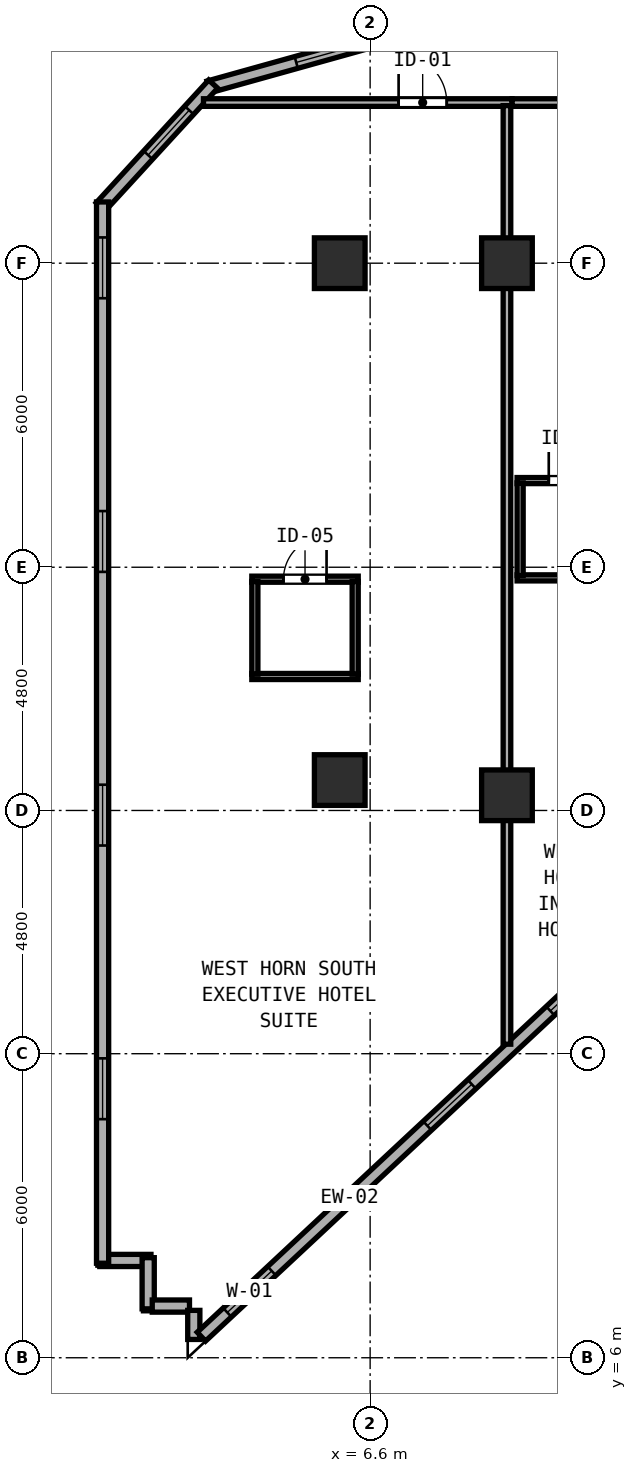
"""IFC4 building model, lengths in metres.
Left out: names, types, materials, properties, quantities, classifications, styles, units other than length and angle.
Written with IfcOpenShell. Run it as: python <this file> out.ifc"""

import sys

from ifc_helpers import new_model, si_unit, direction, frame, frame_2d, origin, origin_2d, place, context, subcontext, project, spatial, rectangle, hollow_rectangle, extrude, element, fill, save


model = new_model("IFC4")
c1 = context("Model", 3, precision=1e-05, world=origin(), true_north=direction((0.0, 1.0)))
c2 = subcontext(c1, "Body", "Model", "MODEL_VIEW")
j1 = project(units=[si_unit("LENGTHUNIT", "METRE"), si_unit("PLANEANGLEUNIT", "RADIAN")], contexts=[c1])
p1 = place(None, origin())
s1 = spatial("IfcSite", under=j1, at=p1, CompositionType="ELEMENT")
p2 = place(p1, origin())
s2 = spatial("IfcBuilding", under=s1, at=p2, CompositionType="ELEMENT")
p3 = place(p2, frame((0.0, 0.0, 81.8)))
s3 = spatial("IfcBuildingStorey", under=s2, at=p3, CompositionType="ELEMENT", Elevation=81.8)
for number, where, z_axis, x_axis in (
    (1, (6.0, 17.4, 0.0), (0.0, 0.0, 1.0), (1.0, 0.0, 0.0)),
    (2, (6.0, 27.6, 0.0), (0.0, 0.0, 1.0), (1.0, 0.0, 0.0)),
    (3, (9.3, 17.1, 0.0), (0.0, 0.0, 1.0), (1.0, 0.0, 0.0)),
    (4, (9.3, 27.6, 0.0), (0.0, 0.0, 1.0), (1.0, 0.0, 0.0)),
):
    element("IfcColumn", number, at=place(p3, frame(where, z_axis=z_axis, x_axis=x_axis)), inside=s3, PredefinedType="COLUMN", context=c2, shape_type="SweptSolid", body=[
        extrude(hollow_rectangle(XDim=1.0, YDim=1.0, WallThickness=0.038, at=origin_2d()), origin(), (0.0, 0.0, 1.0), 3.8),
    ])
for number, where, z_axis, x_axis in (
    (5, (1.265, 7.92, 0.0), (0.0, 0.0, 1.0), (1.0, 0.0, 0.0)),
    (6, (2.22, 7.975, 0.0), (0.0, 0.0, 1.0), (0.0, -1.0, 0.0)),
):
    element("IfcWall", number, at=place(p3, frame(where, z_axis=z_axis, x_axis=x_axis)), inside=s3, PredefinedType="SOLIDWALL", context=c2, shape_type="SweptSolid", body=[
        extrude(rectangle(XDim=1.01, YDim=0.24, at=frame_2d((0.505, 0.0))), origin(), (0.0, 0.0, 1.0), 3.6),
    ])
p4 = place(p3, frame((2.3, 7.02, 0.0), z_axis=(0.0, 0.0, 1.0), x_axis=(1.0, 0.0, 0.0)))
e7 = element("IfcWall", 7, at=p4, inside=s3, PredefinedType="SOLIDWALL", context=c2, shape_type="SweptSolid", body=[
    extrude(rectangle(XDim=0.735, YDim=0.24, at=frame_2d((0.367, 0.0))), origin(), (0.0, 0.0, 1.0), 3.6),
])
p5 = place(p3, frame((3.12, 6.935, 0.0), z_axis=(0.0, 0.0, 1.0), x_axis=(0.0, -1.0, 0.0)))
e8 = element("IfcWall", 8, at=p5, inside=s3, PredefinedType="SOLIDWALL", context=c2, shape_type="SweptSolid", body=[
    extrude(rectangle(XDim=0.574, YDim=0.24, at=frame_2d((0.287, 0.0))), origin(), (0.0, 0.0, 1.0), 3.6),
])
p6 = place(p3, frame((3.27, 6.416, 0.0), z_axis=(0.0, 0.0, 1.0), x_axis=(0.731064187858, 0.682308693505, 0.0)))
e9 = element("IfcWall", 9, at=p6, inside=s3, PredefinedType="SOLIDWALL", context=c2, shape_type="SweptSolid", body=[
    extrude(rectangle(XDim=11.833, YDim=0.24, at=frame_2d((5.916, 0.0))), origin(), (0.0, 0.0, 1.0), 3.6),
])
p7 = place(p6, frame((0.7, 0.0, 0.85)))
e10 = element("IfcOpeningElement", 10, at=p7, cuts=e9, PredefinedType="OPENING", context=c2, shape_type="SweptSolid", body=[
    extrude(rectangle(XDim=1.2, YDim=1.85, at=frame_2d((0.6, 0.925))), frame((0.0, 0.13, 0.0), z_axis=(0.0, -1.0, 0.0), x_axis=(1.0, 0.0, 0.0)), (0.0, 0.0, 1.0), 0.26),
])
p8 = place(p6, frame((6.1, 0.0, 0.85)))
e11 = element("IfcOpeningElement", 11, at=p8, cuts=e9, PredefinedType="OPENING", context=c2, shape_type="SweptSolid", body=[
    extrude(rectangle(XDim=1.2, YDim=1.85, at=frame_2d((0.6, 0.925))), frame((0.0, 0.13, 0.0), z_axis=(0.0, -1.0, 0.0), x_axis=(1.0, 0.0, 0.0)), (0.0, 0.0, 1.0), 0.26),
])
p9 = place(p6, frame((9.421, 0.0, 0.85)))
e12 = element("IfcOpeningElement", 12, at=p9, cuts=e9, PredefinedType="OPENING", context=c2, shape_type="SweptSolid", body=[
    extrude(rectangle(XDim=1.2, YDim=1.85, at=frame_2d((0.6, 0.925))), frame((0.0, 0.13, 0.0), z_axis=(0.0, -1.0, 0.0), x_axis=(1.0, 0.0, 0.0)), (0.0, 0.0, 1.0), 0.26),
])
p10 = place(p3, frame((12.173, 33.524, 0.0), z_axis=(0.0, 0.0, 1.0), x_axis=(-0.963197271032, -0.268795493036, 0.0)))
e13 = element("IfcWall", 13, at=p10, inside=s3, PredefinedType="SOLIDWALL", context=c2, shape_type="SweptSolid", body=[
    extrude(rectangle(XDim=9.095, YDim=0.24, at=frame_2d((4.548, 0.0))), origin(), (0.0, 0.0, 1.0), 3.6),
])
p11 = place(p10, frame((0.7, 0.0, 0.85)))
e14 = element("IfcOpeningElement", 14, at=p11, cuts=e13, PredefinedType="OPENING", context=c2, shape_type="SweptSolid", body=[
    extrude(rectangle(XDim=1.2, YDim=1.85, at=frame_2d((0.6, 0.925))), frame((0.0, 0.13, 0.0), z_axis=(0.0, -1.0, 0.0), x_axis=(1.0, 0.0, 0.0)), (0.0, 0.0, 1.0), 0.26),
])
p12 = place(p10, frame((6.1, 0.0, 0.85)))
e15 = element("IfcOpeningElement", 15, at=p12, cuts=e13, PredefinedType="OPENING", context=c2, shape_type="SweptSolid", body=[
    extrude(rectangle(XDim=1.2, YDim=1.85, at=frame_2d((0.6, 0.925))), frame((0.0, 0.13, 0.0), z_axis=(0.0, -1.0, 0.0), x_axis=(1.0, 0.0, 0.0)), (0.0, 0.0, 1.0), 0.26),
])
p13 = place(p3, frame((3.502, 31.134, 0.0), z_axis=(0.0, 0.0, 1.0), x_axis=(-0.675781844312, -0.737101688302, 0.0)))
e16 = element("IfcWall", 16, at=p13, inside=s3, PredefinedType="SOLIDWALL", context=c2, shape_type="SweptSolid", body=[
    extrude(rectangle(XDim=3.285, YDim=0.24, at=frame_2d((1.642, 0.0))), origin(), (0.0, 0.0, 1.0), 3.6),
])
p14 = place(p13, frame((0.7, 0.0, 0.85)))
e17 = element("IfcOpeningElement", 17, at=p14, cuts=e16, PredefinedType="OPENING", context=c2, shape_type="SweptSolid", body=[
    extrude(rectangle(XDim=1.2, YDim=1.85, at=frame_2d((0.6, 0.925))), frame((0.0, 0.13, 0.0), z_axis=(0.0, -1.0, 0.0), x_axis=(1.0, 0.0, 0.0)), (0.0, 0.0, 1.0), 0.26),
])
p15 = place(p3, frame((1.32, 28.808, 0.0), z_axis=(0.0, 0.0, 1.0), x_axis=(0.0, -1.0, 0.0)))
e18 = element("IfcWall", 18, at=p15, inside=s3, PredefinedType="SOLIDWALL", context=c2, shape_type="SweptSolid", body=[
    extrude(rectangle(XDim=20.943, YDim=0.24, at=frame_2d((10.472, 0.0))), origin(), (0.0, 0.0, 1.0), 3.6),
])
p16 = place(p15, frame((0.7, 0.0, 0.85)))
e19 = element("IfcOpeningElement", 19, at=p16, cuts=e18, PredefinedType="OPENING", context=c2, shape_type="SweptSolid", body=[
    extrude(rectangle(XDim=1.2, YDim=1.85, at=frame_2d((0.6, 0.925))), frame((0.0, 0.13, 0.0), z_axis=(0.0, -1.0, 0.0), x_axis=(1.0, 0.0, 0.0)), (0.0, 0.0, 1.0), 0.26),
])
p17 = place(p15, frame((6.1, 0.0, 0.85)))
e20 = element("IfcOpeningElement", 20, at=p17, cuts=e18, PredefinedType="OPENING", context=c2, shape_type="SweptSolid", body=[
    extrude(rectangle(XDim=1.2, YDim=1.85, at=frame_2d((0.6, 0.925))), frame((0.0, 0.13, 0.0), z_axis=(0.0, -1.0, 0.0), x_axis=(1.0, 0.0, 0.0)), (0.0, 0.0, 1.0), 0.26),
])
p18 = place(p15, frame((11.5, 0.0, 0.85)))
e21 = element("IfcOpeningElement", 21, at=p18, cuts=e18, PredefinedType="OPENING", context=c2, shape_type="SweptSolid", body=[
    extrude(rectangle(XDim=1.2, YDim=1.85, at=frame_2d((0.6, 0.925))), frame((0.0, 0.13, 0.0), z_axis=(0.0, -1.0, 0.0), x_axis=(1.0, 0.0, 0.0)), (0.0, 0.0, 1.0), 0.26),
])
p19 = place(p15, frame((16.9, 0.0, 0.85)))
e22 = element("IfcOpeningElement", 22, at=p19, cuts=e18, PredefinedType="OPENING", context=c2, shape_type="SweptSolid", body=[
    extrude(rectangle(XDim=1.2, YDim=1.85, at=frame_2d((0.6, 0.925))), frame((0.0, 0.13, 0.0), z_axis=(0.0, -1.0, 0.0), x_axis=(1.0, 0.0, 0.0)), (0.0, 0.0, 1.0), 0.26),
])
p20 = place(p3, frame((3.311, 30.77, 0.0), z_axis=(0.0, 0.0, 1.0), x_axis=(1.0, 0.0, 0.0)))
e23 = element("IfcWall", 23, at=p20, inside=s3, PredefinedType="PARTITIONING", context=c2, shape_type="SweptSolid", body=[
    extrude(rectangle(XDim=6.089, YDim=0.15, at=frame_2d((3.044, 0.0))), origin(), (0.0, 0.0, 1.0), 3.6),
])
p21 = place(p20, frame((4.801, 0.0, 0.0), z_axis=(0.0, 0.0, 1.0), x_axis=(-1.0, 0.0, 0.0)))
e24 = element("IfcOpeningElement", 24, at=p21, cuts=e23, PredefinedType="OPENING", context=c2, shape_type="SweptSolid", body=[
    extrude(rectangle(XDim=0.95, YDim=2.18, at=frame_2d((0.475, 1.09))), frame((0.0, 0.085, 0.0), z_axis=(0.0, -1.0, 0.0), x_axis=(1.0, 0.0, 0.0)), (0.0, 0.0, 1.0), 0.17),
])
p22 = place(p3, frame((9.3, 12.188, 0.0), z_axis=(0.0, 0.0, 1.0), x_axis=(0.0, 1.0, 0.0)))
e25 = element("IfcWall", 25, at=p22, inside=s3, PredefinedType="PARTITIONING", context=c2, shape_type="SweptSolid", body=[
    extrude(rectangle(XDim=18.522, YDim=0.15, at=frame_2d((9.261, 0.0))), origin(), (0.0, 0.0, 1.0), 3.6),
])
p23 = place(p3, frame((4.265, 21.364, 0.0), z_axis=(0.0, 0.0, 1.0), x_axis=(1.0, 0.0, 0.0)))
e26 = element("IfcWall", 26, at=p23, inside=s3, PredefinedType="PARTITIONING", context=c2, shape_type="SweptSolid", body=[
    extrude(rectangle(XDim=2.1, YDim=0.12, at=frame_2d((1.05, 0.0))), origin(), (0.0, 0.0, 1.0), 3.6),
])
p24 = place(p23, frame((1.475, 0.0, 0.0), z_axis=(0.0, 0.0, 1.0), x_axis=(-1.0, 0.0, 0.0)))
e27 = element("IfcOpeningElement", 27, at=p24, cuts=e26, PredefinedType="OPENING", context=c2, shape_type="SweptSolid", body=[
    extrude(rectangle(XDim=0.85, YDim=2.1, at=frame_2d((0.425, 1.05))), frame((0.0, 0.07, 0.0), z_axis=(0.0, -1.0, 0.0), x_axis=(1.0, 0.0, 0.0)), (0.0, 0.0, 1.0), 0.14),
])
p25 = place(p3, frame((4.265, 19.444, 0.0), z_axis=(0.0, 0.0, 1.0), x_axis=(1.0, 0.0, 0.0)))
e28 = element("IfcWall", 28, at=p25, inside=s3, PredefinedType="PARTITIONING", context=c2, shape_type="SweptSolid", body=[
    extrude(rectangle(XDim=2.1, YDim=0.12, at=frame_2d((1.05, 0.0))), origin(), (0.0, 0.0, 1.0), 3.6),
])
for number, where, z_axis, x_axis in (
    (29, (4.325, 19.489, 0.0), (0.0, 0.0, 1.0), (0.0, 1.0, 0.0)),
    (30, (6.305, 19.489, 0.0), (0.0, 0.0, 1.0), (0.0, 1.0, 0.0)),
):
    element("IfcWall", number, at=place(p3, frame(where, z_axis=z_axis, x_axis=x_axis)), inside=s3, PredefinedType="PARTITIONING", context=c2, shape_type="SweptSolid", body=[
        extrude(rectangle(XDim=1.83, YDim=0.12, at=frame_2d((0.915, 0.0))), origin(), (0.0, 0.0, 1.0), 3.6),
    ])
p26 = place(p3, frame((9.402, 30.77, 0.0), z_axis=(0.0, 0.0, 1.0), x_axis=(1.0, 0.0, 0.0)))
e31 = element("IfcWall", 31, at=p26, inside=s3, PredefinedType="PARTITIONING", context=c2, shape_type="SweptSolid", body=[
    extrude(rectangle(XDim=2.296, YDim=0.15, at=frame_2d((1.148, 0.0))), origin(), (0.0, 0.0, 1.0), 3.6),
])
p27 = place(p26, frame((1.934, 0.0, 0.0), z_axis=(0.0, 0.0, 1.0), x_axis=(-1.0, 0.0, 0.0)))
e32 = element("IfcOpeningElement", 32, at=p27, cuts=e31, PredefinedType="OPENING", context=c2, shape_type="SweptSolid", body=[
    extrude(rectangle(XDim=0.95, YDim=2.15, at=frame_2d((0.475, 1.075))), frame((0.0, 0.085, 0.0), z_axis=(0.0, -1.0, 0.0), x_axis=(1.0, 0.0, 0.0)), (0.0, 0.0, 1.0), 0.17),
])
p28 = place(p3, frame((9.5, 23.31, 0.0), z_axis=(0.0, 0.0, 1.0), x_axis=(1.0, 0.0, 0.0)))
e33 = element("IfcWall", 33, at=p28, inside=s3, PredefinedType="PARTITIONING", context=c2, shape_type="SweptSolid", body=[
    extrude(rectangle(XDim=2.1, YDim=0.12, at=frame_2d((1.05, 0.0))), origin(), (0.0, 0.0, 1.0), 3.6),
])
p29 = place(p28, frame((1.475, 0.0, 0.0), z_axis=(0.0, 0.0, 1.0), x_axis=(-1.0, 0.0, 0.0)))
e34 = element("IfcOpeningElement", 34, at=p29, cuts=e33, PredefinedType="OPENING", context=c2, shape_type="SweptSolid", body=[
    extrude(rectangle(XDim=0.85, YDim=2.1, at=frame_2d((0.425, 1.05))), frame((0.0, 0.07, 0.0), z_axis=(0.0, -1.0, 0.0), x_axis=(1.0, 0.0, 0.0)), (0.0, 0.0, 1.0), 0.14),
])
p30 = place(p3, frame((9.5, 21.39, 0.0), z_axis=(0.0, 0.0, 1.0), x_axis=(1.0, 0.0, 0.0)))
e35 = element("IfcWall", 35, at=p30, inside=s3, PredefinedType="PARTITIONING", context=c2, shape_type="SweptSolid", body=[
    extrude(rectangle(XDim=2.1, YDim=0.12, at=frame_2d((1.05, 0.0))), origin(), (0.0, 0.0, 1.0), 3.6),
])
p31 = place(p3, frame((9.56, 21.435, 0.0), z_axis=(0.0, 0.0, 1.0), x_axis=(0.0, 1.0, 0.0)))
e36 = element("IfcWall", 36, at=p31, inside=s3, PredefinedType="PARTITIONING", context=c2, shape_type="SweptSolid", body=[
    extrude(rectangle(XDim=1.83, YDim=0.12, at=frame_2d((0.915, 0.0))), origin(), (0.0, 0.0, 1.0), 3.6),
])
p32 = place(p7, origin())
e37 = element("IfcWindow", 37, at=p32, inside=s3, PartitioningType="SINGLE_PANEL", PredefinedType="WINDOW", context=c2, shape_type="SweptSolid", body=[
    extrude(rectangle(XDim=1.2, YDim=1.85, at=frame_2d((0.6, 0.925))), frame((0.0, 0.03, 0.0), z_axis=(0.0, -1.0, 0.0), x_axis=(1.0, 0.0, 0.0)), (0.0, 0.0, 1.0), 0.06),
])
fill(e10, e37)
p33 = place(p8, origin())
e38 = element("IfcWindow", 38, at=p33, inside=s3, PartitioningType="SINGLE_PANEL", PredefinedType="WINDOW", context=c2, shape_type="SweptSolid", body=[
    extrude(rectangle(XDim=1.2, YDim=1.85, at=frame_2d((0.6, 0.925))), frame((0.0, 0.03, 0.0), z_axis=(0.0, -1.0, 0.0), x_axis=(1.0, 0.0, 0.0)), (0.0, 0.0, 1.0), 0.06),
])
fill(e11, e38)
p34 = place(p12, origin())
e39 = element("IfcWindow", 39, at=p34, inside=s3, PartitioningType="SINGLE_PANEL", PredefinedType="WINDOW", context=c2, shape_type="SweptSolid", body=[
    extrude(rectangle(XDim=1.2, YDim=1.85, at=frame_2d((0.6, 0.925))), frame((0.0, 0.03, 0.0), z_axis=(0.0, -1.0, 0.0), x_axis=(1.0, 0.0, 0.0)), (0.0, 0.0, 1.0), 0.06),
])
fill(e15, e39)
p35 = place(p14, origin())
e40 = element("IfcWindow", 40, at=p35, inside=s3, PartitioningType="SINGLE_PANEL", PredefinedType="WINDOW", context=c2, shape_type="SweptSolid", body=[
    extrude(rectangle(XDim=1.2, YDim=1.85, at=frame_2d((0.6, 0.925))), frame((0.0, 0.03, 0.0), z_axis=(0.0, -1.0, 0.0), x_axis=(1.0, 0.0, 0.0)), (0.0, 0.0, 1.0), 0.06),
])
fill(e17, e40)
p36 = place(p16, origin())
e41 = element("IfcWindow", 41, at=p36, inside=s3, PartitioningType="SINGLE_PANEL", PredefinedType="WINDOW", context=c2, shape_type="SweptSolid", body=[
    extrude(rectangle(XDim=1.2, YDim=1.85, at=frame_2d((0.6, 0.925))), frame((0.0, 0.03, 0.0), z_axis=(0.0, -1.0, 0.0), x_axis=(1.0, 0.0, 0.0)), (0.0, 0.0, 1.0), 0.06),
])
fill(e19, e41)
p37 = place(p17, origin())
e42 = element("IfcWindow", 42, at=p37, inside=s3, PartitioningType="SINGLE_PANEL", PredefinedType="WINDOW", context=c2, shape_type="SweptSolid", body=[
    extrude(rectangle(XDim=1.2, YDim=1.85, at=frame_2d((0.6, 0.925))), frame((0.0, 0.03, 0.0), z_axis=(0.0, -1.0, 0.0), x_axis=(1.0, 0.0, 0.0)), (0.0, 0.0, 1.0), 0.06),
])
fill(e20, e42)
p38 = place(p18, origin())
e43 = element("IfcWindow", 43, at=p38, inside=s3, PartitioningType="SINGLE_PANEL", PredefinedType="WINDOW", context=c2, shape_type="SweptSolid", body=[
    extrude(rectangle(XDim=1.2, YDim=1.85, at=frame_2d((0.6, 0.925))), frame((0.0, 0.03, 0.0), z_axis=(0.0, -1.0, 0.0), x_axis=(1.0, 0.0, 0.0)), (0.0, 0.0, 1.0), 0.06),
])
fill(e21, e43)
p39 = place(p19, origin())
e44 = element("IfcWindow", 44, at=p39, inside=s3, PartitioningType="SINGLE_PANEL", PredefinedType="WINDOW", context=c2, shape_type="SweptSolid", body=[
    extrude(rectangle(XDim=1.2, YDim=1.85, at=frame_2d((0.6, 0.925))), frame((0.0, 0.03, 0.0), z_axis=(0.0, -1.0, 0.0), x_axis=(1.0, 0.0, 0.0)), (0.0, 0.0, 1.0), 0.06),
])
fill(e22, e44)
p40 = place(p21, origin())
e45 = element("IfcDoor", 45, at=p40, inside=s3, OperationType="SINGLE_SWING_RIGHT", PredefinedType="DOOR", context=c2, shape_type="SweptSolid", body=[
    extrude(rectangle(XDim=0.95, YDim=2.18, at=frame_2d((0.475, 1.09))), frame((0.0, 0.025, 0.0), z_axis=(0.0, -1.0, 0.0), x_axis=(1.0, 0.0, 0.0)), (0.0, 0.0, 1.0), 0.05),
])
fill(e24, e45)
p41 = place(p24, origin())
e46 = element("IfcDoor", 46, at=p41, inside=s3, OperationType="SINGLE_SWING_LEFT", PredefinedType="DOOR", context=c2, shape_type="SweptSolid", body=[
    extrude(rectangle(XDim=0.85, YDim=2.1, at=frame_2d((0.425, 1.05))), frame((0.0, 0.025, 0.0), z_axis=(0.0, -1.0, 0.0), x_axis=(1.0, 0.0, 0.0)), (0.0, 0.0, 1.0), 0.05),
])
fill(e27, e46)
p42 = place(p29, origin())
e47 = element("IfcDoor", 47, at=p42, inside=s3, OperationType="SINGLE_SWING_RIGHT", PredefinedType="DOOR", context=c2, shape_type="SweptSolid", body=[
    extrude(rectangle(XDim=0.85, YDim=2.1, at=frame_2d((0.425, 1.05))), frame((0.0, 0.025, 0.0), z_axis=(0.0, -1.0, 0.0), x_axis=(1.0, 0.0, 0.0)), (0.0, 0.0, 1.0), 0.05),
])
fill(e34, e47)
p43 = place(p9, origin())
e48 = element("IfcWindow", 48, at=p43, inside=s3, PartitioningType="SINGLE_PANEL", PredefinedType="WINDOW", context=c2, shape_type="SweptSolid", body=[
    extrude(rectangle(XDim=1.2, YDim=1.85, at=frame_2d((0.6, 0.925))), frame((0.0, 0.03, 0.0), z_axis=(0.0, -1.0, 0.0), x_axis=(1.0, 0.0, 0.0)), (0.0, 0.0, 1.0), 0.06),
])
fill(e12, e48)
save(model, sys.argv[1])
